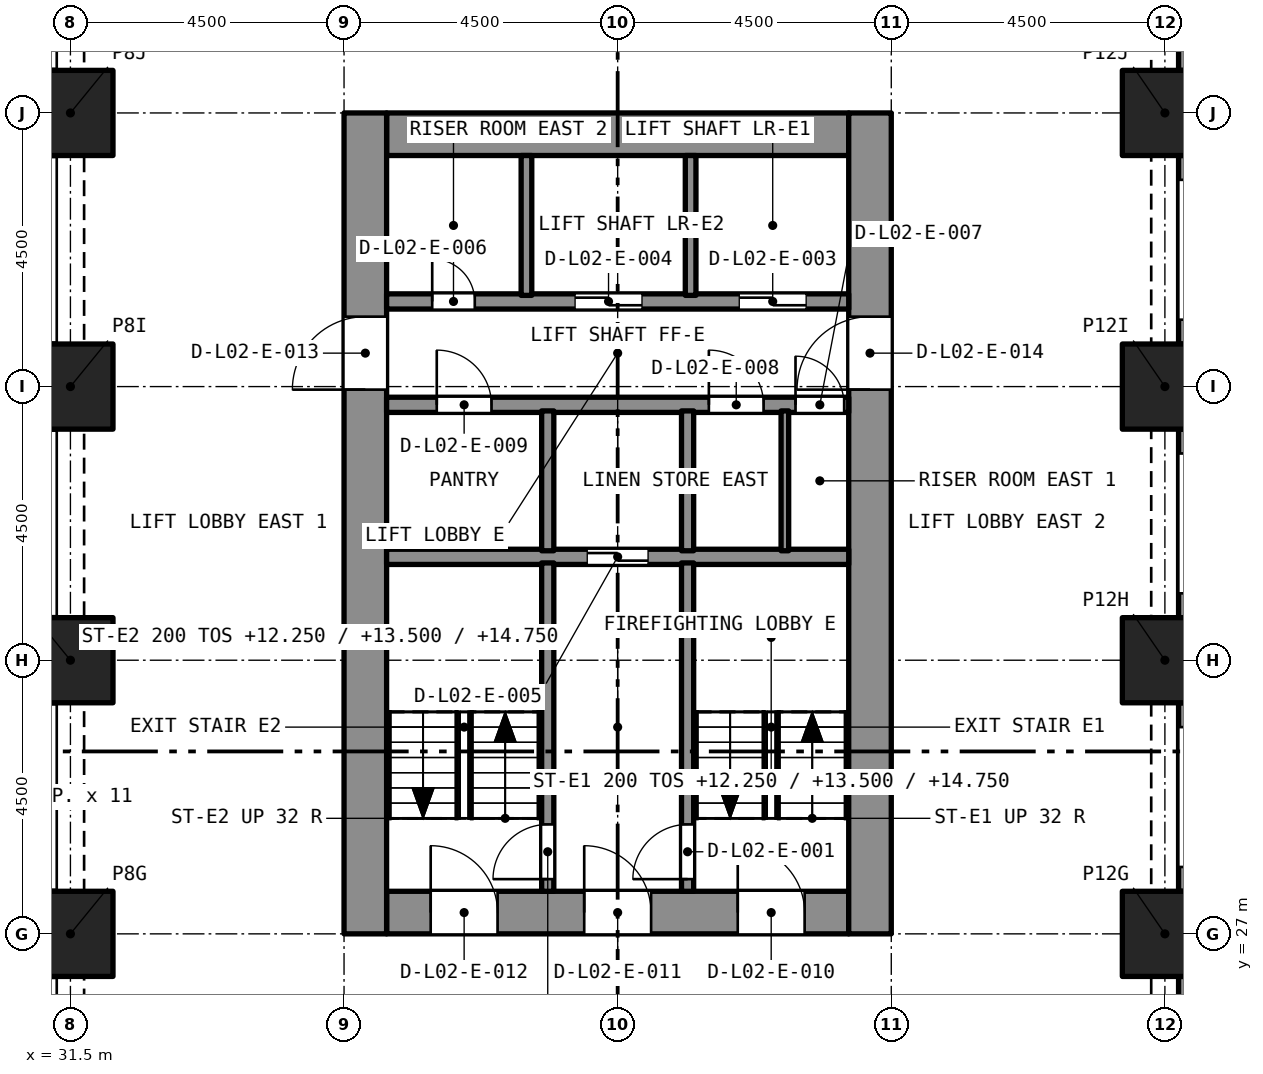
"""IFC4 building model, lengths in metres.
Left out: names, types, materials, properties, quantities, classifications, styles, units other than length and angle.
Written with IfcOpenShell. Run it as: python <this file> out.ifc"""

import sys

from ifc_helpers import new_model, si_unit, direction, frame, frame_2d, origin, origin_2d, place, context, subcontext, project, spatial, rectangle, extrude, element, fill, save


model = new_model("IFC4")
c1 = context("Model", 3, precision=1e-05, world=origin(), true_north=direction((0.0, 1.0)))
c2 = subcontext(c1, "Body", "Model", "MODEL_VIEW")
j1 = project(units=[si_unit("LENGTHUNIT", "METRE"), si_unit("PLANEANGLEUNIT", "RADIAN")], contexts=[c1])
p1 = place(None, origin())
s1 = spatial("IfcSite", under=j1, at=p1, CompositionType="ELEMENT")
p2 = place(p1, origin())
s2 = spatial("IfcBuilding", under=s1, at=p2, CompositionType="ELEMENT")
p3 = place(p2, frame((0.0, 0.0, 11.0)))
s3 = spatial("IfcBuildingStorey", under=s2, at=p3, CompositionType="ELEMENT", Elevation=11.0)
for number, where, z_axis, x_axis in (
    (1, (31.5, 27.0, 0.0), (0.0, 0.0, 1.0), (1.0, 0.0, 0.0)),
    (2, (49.5, 27.0, 0.0), (0.0, 0.0, 1.0), (1.0, 0.0, 0.0)),
    (3, (31.5, 31.5, 0.0), (0.0, 0.0, 1.0), (1.0, 0.0, 0.0)),
    (4, (49.5, 31.5, 0.0), (0.0, 0.0, 1.0), (1.0, 0.0, 0.0)),
    (5, (31.5, 36.0, 0.0), (0.0, 0.0, 1.0), (1.0, 0.0, 0.0)),
    (6, (49.5, 36.0, 0.0), (0.0, 0.0, 1.0), (1.0, 0.0, 0.0)),
    (7, (31.5, 40.5, 0.0), (0.0, 0.0, 1.0), (1.0, 0.0, 0.0)),
    (8, (49.5, 40.5, 0.0), (0.0, 0.0, 1.0), (1.0, 0.0, 0.0)),
):
    element("IfcColumn", number, at=place(p3, frame(where, z_axis=z_axis, x_axis=x_axis)), inside=s3, PredefinedType="COLUMN", context=c2, shape_type="SweptSolid", body=[
        extrude(rectangle(XDim=1.4, YDim=1.4, at=origin_2d()), origin(), (0.0, 0.0, 1.0), 5.0),
    ])
p4 = place(p3, frame((36.7, 27.35, 0.0), z_axis=(0.0, 0.0, 1.0), x_axis=(1.0, 0.0, 0.0)))
e9 = element("IfcWall", 9, at=p4, inside=s3, PredefinedType="SOLIDWALL", context=c2, shape_type="SweptSolid", body=[
    extrude(rectangle(XDim=7.6, YDim=0.7, at=frame_2d((3.8, 0.0))), origin(), (0.0, 0.0, 1.0), 5.0),
])
p5 = place(p4, frame((5.775, 0.0, 0.0)))
e10 = element("IfcOpeningElement", 10, at=p5, cuts=e9, PredefinedType="OPENING", context=c2, shape_type="SweptSolid", body=[
    extrude(rectangle(XDim=1.1, YDim=2.1, at=frame_2d((0.55, 1.05))), frame((0.0, 0.36, 0.0), z_axis=(0.0, -1.0, 0.0), x_axis=(1.0, 0.0, 0.0)), (0.0, 0.0, 1.0), 0.72),
])
p6 = place(p4, frame((3.25, 0.0, 0.0)))
e11 = element("IfcOpeningElement", 11, at=p6, cuts=e9, PredefinedType="OPENING", context=c2, shape_type="SweptSolid", body=[
    extrude(rectangle(XDim=1.1, YDim=2.1, at=frame_2d((0.55, 1.05))), frame((0.0, 0.36, 0.0), z_axis=(0.0, -1.0, 0.0), x_axis=(1.0, 0.0, 0.0)), (0.0, 0.0, 1.0), 0.72),
])
p7 = place(p4, frame((0.725, 0.0, 0.0)))
e12 = element("IfcOpeningElement", 12, at=p7, cuts=e9, PredefinedType="OPENING", context=c2, shape_type="SweptSolid", body=[
    extrude(rectangle(XDim=1.1, YDim=2.1, at=frame_2d((0.55, 1.05))), frame((0.0, 0.36, 0.0), z_axis=(0.0, -1.0, 0.0), x_axis=(1.0, 0.0, 0.0)), (0.0, 0.0, 1.0), 0.72),
])
p8 = place(p3, frame((36.7, 40.15, 0.0), z_axis=(0.0, 0.0, 1.0), x_axis=(1.0, 0.0, 0.0)))
e13 = element("IfcWall", 13, at=p8, inside=s3, PredefinedType="SOLIDWALL", context=c2, shape_type="SweptSolid", body=[
    extrude(rectangle(XDim=7.6, YDim=0.7, at=frame_2d((3.8, 0.0))), origin(), (0.0, 0.0, 1.0), 5.0),
])
p9 = place(p3, frame((36.35, 27.0, 0.0), z_axis=(0.0, 0.0, 1.0), x_axis=(0.0, 1.0, 0.0)))
e14 = element("IfcWall", 14, at=p9, inside=s3, PredefinedType="SOLIDWALL", context=c2, shape_type="SweptSolid", body=[
    extrude(rectangle(XDim=13.5, YDim=0.7, at=frame_2d((6.75, 0.0))), origin(), (0.0, 0.0, 1.0), 5.0),
])
p10 = place(p9, frame((8.95, 0.0, 0.0)))
e15 = element("IfcOpeningElement", 15, at=p10, cuts=e14, PredefinedType="OPENING", context=c2, shape_type="SweptSolid", body=[
    extrude(rectangle(XDim=1.2, YDim=2.1, at=frame_2d((0.6, 1.05))), frame((0.0, 0.36, 0.0), z_axis=(0.0, -1.0, 0.0), x_axis=(1.0, 0.0, 0.0)), (0.0, 0.0, 1.0), 0.72),
])
p11 = place(p3, frame((44.65, 27.0, 0.0), z_axis=(0.0, 0.0, 1.0), x_axis=(0.0, 1.0, 0.0)))
e16 = element("IfcWall", 16, at=p11, inside=s3, PredefinedType="SOLIDWALL", context=c2, shape_type="SweptSolid", body=[
    extrude(rectangle(XDim=13.5, YDim=0.7, at=frame_2d((6.75, 0.0))), origin(), (0.0, 0.0, 1.0), 5.0),
])
p12 = place(p11, frame((8.95, 0.0, 0.0)))
e17 = element("IfcOpeningElement", 17, at=p12, cuts=e16, PredefinedType="OPENING", context=c2, shape_type="SweptSolid", body=[
    extrude(rectangle(XDim=1.2, YDim=2.1, at=frame_2d((0.6, 1.05))), frame((0.0, 0.36, 0.0), z_axis=(0.0, -1.0, 0.0), x_axis=(1.0, 0.0, 0.0)), (0.0, 0.0, 1.0), 0.72),
])
p13 = place(p3, frame((49.875, 26.3, 0.0), z_axis=(0.0, 0.0, 1.0), x_axis=(0.0, -1.0, 0.0)))
e18 = element("IfcWall", 18, at=p13, inside=s3, PredefinedType="SOLIDWALL", context=c2, shape_type="SweptSolid", body=[
    extrude(rectangle(XDim=3.1, YDim=0.3, at=frame_2d((1.55, 0.0))), origin(), (0.0, 0.0, 1.0), 5.0),
])
p14 = place(p13, frame((0.4, 0.0, 0.45)))
e19 = element("IfcOpeningElement", 19, at=p14, cuts=e18, PredefinedType="OPENING", context=c2, shape_type="SweptSolid", body=[
    extrude(rectangle(XDim=2.3, YDim=3.3, at=frame_2d((1.15, 1.65))), frame((0.0, 0.16, 0.0), z_axis=(0.0, -1.0, 0.0), x_axis=(1.0, 0.0, 0.0)), (0.0, 0.0, 1.0), 0.32),
])
p15 = place(p3, frame((49.875, 30.8, 0.0), z_axis=(0.0, 0.0, 1.0), x_axis=(0.0, -1.0, 0.0)))
e20 = element("IfcWall", 20, at=p15, inside=s3, PredefinedType="SOLIDWALL", context=c2, shape_type="SweptSolid", body=[
    extrude(rectangle(XDim=3.1, YDim=0.3, at=frame_2d((1.55, 0.0))), origin(), (0.0, 0.0, 1.0), 5.0),
])
p16 = place(p15, frame((0.4, 0.0, 0.45)))
e21 = element("IfcOpeningElement", 21, at=p16, cuts=e20, PredefinedType="OPENING", context=c2, shape_type="SweptSolid", body=[
    extrude(rectangle(XDim=2.3, YDim=3.3, at=frame_2d((1.15, 1.65))), frame((0.0, 0.16, 0.0), z_axis=(0.0, -1.0, 0.0), x_axis=(1.0, 0.0, 0.0)), (0.0, 0.0, 1.0), 0.32),
])
p17 = place(p3, frame((49.875, 35.3, 0.0), z_axis=(0.0, 0.0, 1.0), x_axis=(0.0, -1.0, 0.0)))
e22 = element("IfcWall", 22, at=p17, inside=s3, PredefinedType="SOLIDWALL", context=c2, shape_type="SweptSolid", body=[
    extrude(rectangle(XDim=3.1, YDim=0.3, at=frame_2d((1.55, 0.0))), origin(), (0.0, 0.0, 1.0), 5.0),
])
p18 = place(p17, frame((0.4, 0.0, 0.45)))
e23 = element("IfcOpeningElement", 23, at=p18, cuts=e22, PredefinedType="OPENING", context=c2, shape_type="SweptSolid", body=[
    extrude(rectangle(XDim=2.3, YDim=3.3, at=frame_2d((1.15, 1.65))), frame((0.0, 0.16, 0.0), z_axis=(0.0, -1.0, 0.0), x_axis=(1.0, 0.0, 0.0)), (0.0, 0.0, 1.0), 0.32),
])
p19 = place(p3, frame((49.875, 39.8, 0.0), z_axis=(0.0, 0.0, 1.0), x_axis=(0.0, -1.0, 0.0)))
e24 = element("IfcWall", 24, at=p19, inside=s3, PredefinedType="SOLIDWALL", context=c2, shape_type="SweptSolid", body=[
    extrude(rectangle(XDim=3.1, YDim=0.3, at=frame_2d((1.55, 0.0))), origin(), (0.0, 0.0, 1.0), 5.0),
])
p20 = place(p19, frame((0.4, 0.0, 0.45)))
e25 = element("IfcOpeningElement", 25, at=p20, cuts=e24, PredefinedType="OPENING", context=c2, shape_type="SweptSolid", body=[
    extrude(rectangle(XDim=2.3, YDim=3.3, at=frame_2d((1.15, 1.65))), frame((0.0, 0.16, 0.0), z_axis=(0.0, -1.0, 0.0), x_axis=(1.0, 0.0, 0.0)), (0.0, 0.0, 1.0), 0.32),
])
p21 = place(p3, frame((49.875, 44.3, 0.0), z_axis=(0.0, 0.0, 1.0), x_axis=(0.0, -1.0, 0.0)))
e26 = element("IfcWall", 26, at=p21, inside=s3, PredefinedType="SOLIDWALL", context=c2, shape_type="SweptSolid", body=[
    extrude(rectangle(XDim=3.1, YDim=0.3, at=frame_2d((1.55, 0.0))), origin(), (0.0, 0.0, 1.0), 5.0),
])
p22 = place(p21, frame((0.4, 0.0, 0.45)))
e27 = element("IfcOpeningElement", 27, at=p22, cuts=e26, PredefinedType="OPENING", context=c2, shape_type="SweptSolid", body=[
    extrude(rectangle(XDim=2.3, YDim=3.3, at=frame_2d((1.15, 1.65))), frame((0.0, 0.16, 0.0), z_axis=(0.0, -1.0, 0.0), x_axis=(1.0, 0.0, 0.0)), (0.0, 0.0, 1.0), 0.32),
])
p23 = place(p3, frame((36.7, 33.2, 0.0), z_axis=(0.0, 0.0, 1.0), x_axis=(1.0, 0.0, 0.0)))
e28 = element("IfcWall", 28, at=p23, inside=s3, PredefinedType="SOLIDWALL", context=c2, shape_type="SweptSolid", body=[
    extrude(rectangle(XDim=7.6, YDim=0.25, at=frame_2d((3.8, 0.0))), origin(), (0.0, 0.0, 1.0), 4.65),
])
p24 = place(p23, frame((3.3, 0.0, 0.0)))
e29 = element("IfcOpeningElement", 29, at=p24, cuts=e28, PredefinedType="OPENING", context=c2, shape_type="SweptSolid", body=[
    extrude(rectangle(XDim=1.0, YDim=2.1, at=frame_2d((0.5, 1.05))), frame((0.0, 0.135, 0.0), z_axis=(0.0, -1.0, 0.0), x_axis=(1.0, 0.0, 0.0)), (0.0, 0.0, 1.0), 0.27),
])
p25 = place(p3, frame((36.7, 35.7, 0.0), z_axis=(0.0, 0.0, 1.0), x_axis=(1.0, 0.0, 0.0)))
e30 = element("IfcWall", 30, at=p25, inside=s3, PredefinedType="SOLIDWALL", context=c2, shape_type="SweptSolid", body=[
    extrude(rectangle(XDim=7.6, YDim=0.25, at=frame_2d((3.8, 0.0))), origin(), (0.0, 0.0, 1.0), 4.65),
])
p26 = place(p25, frame((6.725, 0.0, 0.0)))
e31 = element("IfcOpeningElement", 31, at=p26, cuts=e30, PredefinedType="OPENING", context=c2, shape_type="SweptSolid", body=[
    extrude(rectangle(XDim=0.8, YDim=2.1, at=frame_2d((0.4, 1.05))), frame((0.0, 0.135, 0.0), z_axis=(0.0, -1.0, 0.0), x_axis=(1.0, 0.0, 0.0)), (0.0, 0.0, 1.0), 0.27),
])
p27 = place(p25, frame((5.3, 0.0, 0.0)))
e32 = element("IfcOpeningElement", 32, at=p27, cuts=e30, PredefinedType="OPENING", context=c2, shape_type="SweptSolid", body=[
    extrude(rectangle(XDim=0.9, YDim=2.1, at=frame_2d((0.45, 1.05))), frame((0.0, 0.135, 0.0), z_axis=(0.0, -1.0, 0.0), x_axis=(1.0, 0.0, 0.0)), (0.0, 0.0, 1.0), 0.27),
])
p28 = place(p25, frame((0.825, 0.0, 0.0)))
e33 = element("IfcOpeningElement", 33, at=p28, cuts=e30, PredefinedType="OPENING", context=c2, shape_type="SweptSolid", body=[
    extrude(rectangle(XDim=0.9, YDim=2.1, at=frame_2d((0.45, 1.05))), frame((0.0, 0.135, 0.0), z_axis=(0.0, -1.0, 0.0), x_axis=(1.0, 0.0, 0.0)), (0.0, 0.0, 1.0), 0.27),
])
p29 = place(p3, frame((36.7, 37.4, 0.0), z_axis=(0.0, 0.0, 1.0), x_axis=(1.0, 0.0, 0.0)))
e34 = element("IfcWall", 34, at=p29, inside=s3, PredefinedType="SOLIDWALL", context=c2, shape_type="SweptSolid", body=[
    extrude(rectangle(XDim=7.6, YDim=0.25, at=frame_2d((3.8, 0.0))), origin(), (0.0, 0.0, 1.0), 4.65),
])
p30 = place(p29, frame((5.8, 0.0, 0.0)))
e35 = element("IfcOpeningElement", 35, at=p30, cuts=e34, PredefinedType="OPENING", context=c2, shape_type="SweptSolid", body=[
    extrude(rectangle(XDim=1.1, YDim=2.4, at=frame_2d((0.55, 1.2))), frame((0.0, 0.135, 0.0), z_axis=(0.0, -1.0, 0.0), x_axis=(1.0, 0.0, 0.0)), (0.0, 0.0, 1.0), 0.27),
])
p31 = place(p29, frame((3.1, 0.0, 0.0)))
e36 = element("IfcOpeningElement", 36, at=p31, cuts=e34, PredefinedType="OPENING", context=c2, shape_type="SweptSolid", body=[
    extrude(rectangle(XDim=1.1, YDim=2.4, at=frame_2d((0.55, 1.2))), frame((0.0, 0.135, 0.0), z_axis=(0.0, -1.0, 0.0), x_axis=(1.0, 0.0, 0.0)), (0.0, 0.0, 1.0), 0.27),
])
p32 = place(p29, frame((0.75, 0.0, 0.0)))
e37 = element("IfcOpeningElement", 37, at=p32, cuts=e34, PredefinedType="OPENING", context=c2, shape_type="SweptSolid", body=[
    extrude(rectangle(XDim=0.7, YDim=2.1, at=frame_2d((0.35, 1.05))), frame((0.0, 0.135, 0.0), z_axis=(0.0, -1.0, 0.0), x_axis=(1.0, 0.0, 0.0)), (0.0, 0.0, 1.0), 0.27),
])
p33 = place(p3, frame((41.65, 27.7, 0.0), z_axis=(0.0, 0.0, 1.0), x_axis=(0.0, 1.0, 0.0)))
e38 = element("IfcWall", 38, at=p33, inside=s3, PredefinedType="SOLIDWALL", context=c2, shape_type="SweptSolid", body=[
    extrude(rectangle(XDim=5.4, YDim=0.2, at=frame_2d((2.7, 0.0))), origin(), (0.0, 0.0, 1.0), 4.65),
])
p34 = place(p33, frame((0.2, 0.0, 0.0)))
e39 = element("IfcOpeningElement", 39, at=p34, cuts=e38, PredefinedType="OPENING", context=c2, shape_type="SweptSolid", body=[
    extrude(rectangle(XDim=0.9, YDim=2.1, at=frame_2d((0.45, 1.05))), frame((0.0, 0.11, 0.0), z_axis=(0.0, -1.0, 0.0), x_axis=(1.0, 0.0, 0.0)), (0.0, 0.0, 1.0), 0.22),
])
p35 = place(p3, frame((39.35, 27.7, 0.0), z_axis=(0.0, 0.0, 1.0), x_axis=(0.0, 1.0, 0.0)))
e40 = element("IfcWall", 40, at=p35, inside=s3, PredefinedType="SOLIDWALL", context=c2, shape_type="SweptSolid", body=[
    extrude(rectangle(XDim=5.4, YDim=0.2, at=frame_2d((2.7, 0.0))), origin(), (0.0, 0.0, 1.0), 4.65),
])
p36 = place(p35, frame((0.2, 0.0, 0.0)))
e41 = element("IfcOpeningElement", 41, at=p36, cuts=e40, PredefinedType="OPENING", context=c2, shape_type="SweptSolid", body=[
    extrude(rectangle(XDim=0.9, YDim=2.1, at=frame_2d((0.45, 1.05))), frame((0.0, 0.11, 0.0), z_axis=(0.0, -1.0, 0.0), x_axis=(1.0, 0.0, 0.0)), (0.0, 0.0, 1.0), 0.22),
])
for number, where, z_axis, x_axis in (
    (42, (41.65, 33.3, 0.0), (0.0, 0.0, 1.0), (0.0, 1.0, 0.0)),
    (43, (39.35, 33.3, 0.0), (0.0, 0.0, 1.0), (0.0, 1.0, 0.0)),
):
    element("IfcWall", number, at=place(p3, frame(where, z_axis=z_axis, x_axis=x_axis)), inside=s3, PredefinedType="SOLIDWALL", context=c2, shape_type="SweptSolid", body=[
        extrude(rectangle(XDim=2.3, YDim=0.2, at=frame_2d((1.15, 0.0))), origin(), (0.0, 0.0, 1.0), 4.65),
    ])
for number, where, z_axis, x_axis in (
    (44, (41.7, 37.5, 0.0), (0.0, 0.0, 1.0), (0.0, 1.0, 0.0)),
    (45, (39.0, 37.5, 0.0), (0.0, 0.0, 1.0), (0.0, 1.0, 0.0)),
):
    element("IfcWall", number, at=place(p3, frame(where, z_axis=z_axis, x_axis=x_axis)), inside=s3, PredefinedType="SOLIDWALL", context=c2, shape_type="SweptSolid", body=[
        extrude(rectangle(XDim=2.3, YDim=0.175, at=frame_2d((1.15, 0.0))), origin(), (0.0, 0.0, 1.0), 4.65),
    ])
p37 = place(p3, frame((43.25, 33.3, 0.0), z_axis=(0.0, 0.0, 1.0), x_axis=(0.0, 1.0, 0.0)))
e46 = element("IfcWall", 46, at=p37, inside=s3, PredefinedType="PARTITIONING", context=c2, shape_type="SweptSolid", body=[
    extrude(rectangle(XDim=2.3, YDim=0.125, at=frame_2d((1.15, 0.0))), origin(), (0.0, 0.0, 1.0), 4.65),
])
p38 = place(p34, origin())
e47 = element("IfcDoor", 47, at=p38, inside=s3, OperationType="SINGLE_SWING_LEFT", PredefinedType="DOOR", context=c2, shape_type="SweptSolid", body=[
    extrude(rectangle(XDim=0.9, YDim=2.1, at=frame_2d((0.45, 1.05))), frame((0.0, 0.025, 0.0), z_axis=(0.0, -1.0, 0.0), x_axis=(1.0, 0.0, 0.0)), (0.0, 0.0, 1.0), 0.05),
])
fill(e39, e47)
p39 = place(p36, origin())
e48 = element("IfcDoor", 48, at=p39, inside=s3, OperationType="SINGLE_SWING_LEFT", PredefinedType="DOOR", context=c2, shape_type="SweptSolid", body=[
    extrude(rectangle(XDim=0.9, YDim=2.1, at=frame_2d((0.45, 1.05))), frame((0.0, 0.025, 0.0), z_axis=(0.0, -1.0, 0.0), x_axis=(1.0, 0.0, 0.0)), (0.0, 0.0, 1.0), 0.05),
])
fill(e41, e48)
p40 = place(p30, origin())
e49 = element("IfcDoor", 49, at=p40, inside=s3, OperationType="SLIDING_TO_LEFT", PredefinedType="DOOR", context=c2, shape_type="SweptSolid", body=[
    extrude(rectangle(XDim=1.1, YDim=2.4, at=frame_2d((0.55, 1.2))), frame((0.0, 0.025, 0.0), z_axis=(0.0, -1.0, 0.0), x_axis=(1.0, 0.0, 0.0)), (0.0, 0.0, 1.0), 0.05),
])
fill(e35, e49)
p41 = place(p31, origin())
e50 = element("IfcDoor", 50, at=p41, inside=s3, OperationType="SLIDING_TO_LEFT", PredefinedType="DOOR", context=c2, shape_type="SweptSolid", body=[
    extrude(rectangle(XDim=1.1, YDim=2.4, at=frame_2d((0.55, 1.2))), frame((0.0, 0.025, 0.0), z_axis=(0.0, -1.0, 0.0), x_axis=(1.0, 0.0, 0.0)), (0.0, 0.0, 1.0), 0.05),
])
fill(e36, e50)
p42 = place(p24, origin())
e51 = element("IfcDoor", 51, at=p42, inside=s3, OperationType="SLIDING_TO_LEFT", PredefinedType="DOOR", context=c2, shape_type="SweptSolid", body=[
    extrude(rectangle(XDim=1.0, YDim=2.1, at=frame_2d((0.5, 1.05))), frame((0.0, 0.025, 0.0), z_axis=(0.0, -1.0, 0.0), x_axis=(1.0, 0.0, 0.0)), (0.0, 0.0, 1.0), 0.05),
])
fill(e29, e51)
p43 = place(p32, origin())
e52 = element("IfcDoor", 52, at=p43, inside=s3, OperationType="SINGLE_SWING_LEFT", PredefinedType="DOOR", context=c2, shape_type="SweptSolid", body=[
    extrude(rectangle(XDim=0.7, YDim=2.1, at=frame_2d((0.35, 1.05))), frame((0.0, 0.025, 0.0), z_axis=(0.0, -1.0, 0.0), x_axis=(1.0, 0.0, 0.0)), (0.0, 0.0, 1.0), 0.05),
])
fill(e37, e52)
p44 = place(p26, origin())
e53 = element("IfcDoor", 53, at=p44, inside=s3, OperationType="SINGLE_SWING_LEFT", PredefinedType="DOOR", context=c2, shape_type="SweptSolid", body=[
    extrude(rectangle(XDim=0.8, YDim=2.1, at=frame_2d((0.4, 1.05))), frame((0.0, 0.025, 0.0), z_axis=(0.0, -1.0, 0.0), x_axis=(1.0, 0.0, 0.0)), (0.0, 0.0, 1.0), 0.05),
])
fill(e31, e53)
p45 = place(p27, origin())
e54 = element("IfcDoor", 54, at=p45, inside=s3, OperationType="SINGLE_SWING_LEFT", PredefinedType="DOOR", context=c2, shape_type="SweptSolid", body=[
    extrude(rectangle(XDim=0.9, YDim=2.1, at=frame_2d((0.45, 1.05))), frame((0.0, 0.025, 0.0), z_axis=(0.0, -1.0, 0.0), x_axis=(1.0, 0.0, 0.0)), (0.0, 0.0, 1.0), 0.05),
])
fill(e32, e54)
p46 = place(p28, origin())
e55 = element("IfcDoor", 55, at=p46, inside=s3, OperationType="SINGLE_SWING_LEFT", PredefinedType="DOOR", context=c2, shape_type="SweptSolid", body=[
    extrude(rectangle(XDim=0.9, YDim=2.1, at=frame_2d((0.45, 1.05))), frame((0.0, 0.025, 0.0), z_axis=(0.0, -1.0, 0.0), x_axis=(1.0, 0.0, 0.0)), (0.0, 0.0, 1.0), 0.05),
])
fill(e33, e55)
p47 = place(p5, origin())
e56 = element("IfcDoor", 56, at=p47, inside=s3, OperationType="SINGLE_SWING_LEFT", PredefinedType="DOOR", context=c2, shape_type="SweptSolid", body=[
    extrude(rectangle(XDim=1.1, YDim=2.1, at=frame_2d((0.55, 1.05))), frame((0.0, 0.025, 0.0), z_axis=(0.0, -1.0, 0.0), x_axis=(1.0, 0.0, 0.0)), (0.0, 0.0, 1.0), 0.05),
])
fill(e10, e56)
p48 = place(p6, origin())
e57 = element("IfcDoor", 57, at=p48, inside=s3, OperationType="SINGLE_SWING_LEFT", PredefinedType="DOOR", context=c2, shape_type="SweptSolid", body=[
    extrude(rectangle(XDim=1.1, YDim=2.1, at=frame_2d((0.55, 1.05))), frame((0.0, 0.025, 0.0), z_axis=(0.0, -1.0, 0.0), x_axis=(1.0, 0.0, 0.0)), (0.0, 0.0, 1.0), 0.05),
])
fill(e11, e57)
p49 = place(p7, origin())
e58 = element("IfcDoor", 58, at=p49, inside=s3, OperationType="SINGLE_SWING_LEFT", PredefinedType="DOOR", context=c2, shape_type="SweptSolid", body=[
    extrude(rectangle(XDim=1.1, YDim=2.1, at=frame_2d((0.55, 1.05))), frame((0.0, 0.025, 0.0), z_axis=(0.0, -1.0, 0.0), x_axis=(1.0, 0.0, 0.0)), (0.0, 0.0, 1.0), 0.05),
])
fill(e12, e58)
p50 = place(p10, origin())
e59 = element("IfcDoor", 59, at=p50, inside=s3, OperationType="SINGLE_SWING_LEFT", PredefinedType="DOOR", context=c2, shape_type="SweptSolid", body=[
    extrude(rectangle(XDim=1.2, YDim=2.1, at=frame_2d((0.6, 1.05))), frame((0.0, 0.025, 0.0), z_axis=(0.0, -1.0, 0.0), x_axis=(1.0, 0.0, 0.0)), (0.0, 0.0, 1.0), 0.05),
])
fill(e15, e59)
p51 = place(p12, origin())
e60 = element("IfcDoor", 60, at=p51, inside=s3, OperationType="SINGLE_SWING_LEFT", PredefinedType="DOOR", context=c2, shape_type="SweptSolid", body=[
    extrude(rectangle(XDim=1.2, YDim=2.1, at=frame_2d((0.6, 1.05))), frame((0.0, 0.025, 0.0), z_axis=(0.0, -1.0, 0.0), x_axis=(1.0, 0.0, 0.0)), (0.0, 0.0, 1.0), 0.05),
])
fill(e17, e60)
save(model, sys.argv[1])
